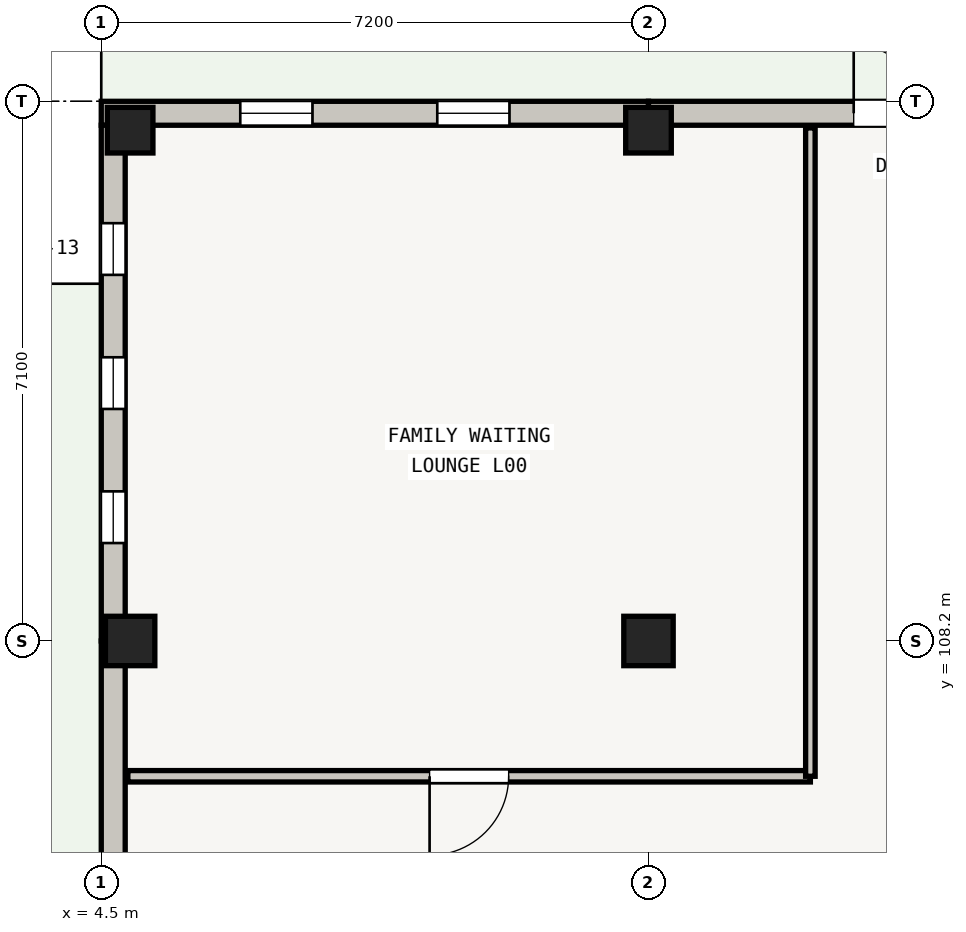
"""IFC4 building model, lengths in metres.
Left out: names, types, materials, properties, quantities, classifications, styles, units other than length and angle.
Written with IfcOpenShell. Run it as: python <this file> out.ifc"""

import sys

from ifc_helpers import new_model, si_unit, direction, frame, frame_2d, origin, origin_2d, place, context, subcontext, project, spatial, rectangle, extrude, element, fill, save


model = new_model("IFC4")
c1 = context("Model", 3, precision=1e-05, world=origin(), true_north=direction((0.0, 1.0)))
c2 = subcontext(c1, "Body", "Model", "MODEL_VIEW")
j1 = project(units=[si_unit("LENGTHUNIT", "METRE"), si_unit("PLANEANGLEUNIT", "RADIAN")], contexts=[c1])
p1 = place(None, origin())
s1 = spatial("IfcSite", under=j1, at=p1, CompositionType="ELEMENT")
p2 = place(p1, origin())
s2 = spatial("IfcBuilding", under=s1, at=p2, CompositionType="ELEMENT")
p3 = place(p2, origin())
s3 = spatial("IfcBuildingStorey", under=s2, at=p3, CompositionType="ELEMENT", Elevation=0.0)
p4 = place(p3, frame((4.88, 108.2, 0.0), z_axis=(0.0, 0.0, 1.0), x_axis=(1.0, 0.0, 0.0)))
e1 = element("IfcColumn", 1, at=p4, inside=s3, PredefinedType="COLUMN", context=c2, shape_type="SweptSolid", body=[
    extrude(rectangle(XDim=0.65, YDim=0.65, at=origin_2d()), origin(), (0.0, 0.0, 1.0), 4.235),
])
p5 = place(p3, frame((4.88, 114.92, 0.0), z_axis=(0.0, 0.0, 1.0), x_axis=(1.0, 0.0, 0.0)))
e2 = element("IfcColumn", 2, at=p5, inside=s3, PredefinedType="COLUMN", context=c2, shape_type="SweptSolid", body=[
    extrude(rectangle(XDim=0.6, YDim=0.6, at=origin_2d()), origin(), (0.0, 0.0, 1.0), 4.235),
])
p6 = place(p3, frame((11.7, 108.2, 0.0), z_axis=(0.0, 0.0, 1.0), x_axis=(1.0, 0.0, 0.0)))
e3 = element("IfcColumn", 3, at=p6, inside=s3, PredefinedType="COLUMN", context=c2, shape_type="SweptSolid", body=[
    extrude(rectangle(XDim=0.65, YDim=0.65, at=origin_2d()), origin(), (0.0, 0.0, 1.0), 4.235),
])
p7 = place(p3, frame((11.7, 114.92, 0.0), z_axis=(0.0, 0.0, 1.0), x_axis=(1.0, 0.0, 0.0)))
e4 = element("IfcColumn", 4, at=p7, inside=s3, PredefinedType="COLUMN", context=c2, shape_type="SweptSolid", body=[
    extrude(rectangle(XDim=0.6, YDim=0.6, at=origin_2d()), origin(), (0.0, 0.0, 1.0), 4.235),
])
p8 = place(p3, frame((4.5, 115.143, 0.0), z_axis=(0.0, 0.0, 1.0), x_axis=(1.0, 0.0, 0.0)))
e5 = element("IfcWall", 5, at=p8, inside=s3, PredefinedType="SOLIDWALL", context=c2, shape_type="SweptSolid", body=[
    extrude(rectangle(XDim=7.2, YDim=0.315, at=frame_2d((3.6, 0.0))), origin(), (0.0, 0.0, 1.0), 3.6),
])
p9 = place(p8, frame((1.829, 0.0, 0.55)))
e6 = element("IfcOpeningElement", 6, at=p9, cuts=e5, PredefinedType="OPENING", context=c2, shape_type="SweptSolid", body=[
    extrude(rectangle(XDim=0.95, YDim=2.02, at=frame_2d((0.475, 1.01))), frame((0.0, 0.157, 0.0), z_axis=(0.0, -1.0, 0.0), x_axis=(1.0, 0.0, 0.0)), (0.0, 0.0, 1.0), 0.315),
])
p10 = place(p8, frame((4.421, 0.0, 0.55)))
e7 = element("IfcOpeningElement", 7, at=p10, cuts=e5, PredefinedType="OPENING", context=c2, shape_type="SweptSolid", body=[
    extrude(rectangle(XDim=0.95, YDim=2.02, at=frame_2d((0.475, 1.01))), frame((0.0, 0.157, 0.0), z_axis=(0.0, -1.0, 0.0), x_axis=(1.0, 0.0, 0.0)), (0.0, 0.0, 1.0), 0.315),
])
p11 = place(p3, frame((11.7, 115.143, 0.0), z_axis=(0.0, 0.0, 1.0), x_axis=(1.0, 0.0, 0.0)))
e8 = element("IfcWall", 8, at=p11, inside=s3, PredefinedType="SOLIDWALL", context=c2, shape_type="SweptSolid", body=[
    extrude(rectangle(XDim=7.2, YDim=0.315, at=frame_2d((3.6, 0.0))), origin(), (0.0, 0.0, 1.0), 3.6),
])
p12 = place(p11, frame((2.7, 0.0, 0.0)))
e9 = element("IfcOpeningElement", 9, at=p12, cuts=e8, PredefinedType="OPENING", context=c2, shape_type="SweptSolid", body=[
    extrude(rectangle(XDim=1.8, YDim=2.1, at=frame_2d((0.9, 1.05))), frame((0.0, 0.157, 0.0), z_axis=(0.0, -1.0, 0.0), x_axis=(1.0, 0.0, 0.0)), (0.0, 0.0, 1.0), 0.315),
])
p13 = place(p3, frame((4.657, 101.48, 0.0), z_axis=(0.0, 0.0, 1.0), x_axis=(0.0, 1.0, 0.0)))
e10 = element("IfcWall", 10, at=p13, inside=s3, PredefinedType="SOLIDWALL", context=c2, shape_type="SweptSolid", body=[
    extrude(rectangle(XDim=6.72, YDim=0.315, at=frame_2d((3.36, 0.0))), origin(), (0.0, 0.0, 1.0), 3.6),
])
p14 = place(p13, frame((3.04, 0.0, 0.55)))
e11 = element("IfcOpeningElement", 11, at=p14, cuts=e10, PredefinedType="OPENING", context=c2, shape_type="SweptSolid", body=[
    extrude(rectangle(XDim=0.64, YDim=2.28, at=frame_2d((0.32, 1.14))), frame((0.0, 0.157, 0.0), z_axis=(0.0, -1.0, 0.0), x_axis=(1.0, 0.0, 0.0)), (0.0, 0.0, 1.0), 0.315),
])
p15 = place(p3, frame((4.657, 108.2, 0.0), z_axis=(0.0, 0.0, 1.0), x_axis=(0.0, 1.0, 0.0)))
e12 = element("IfcWall", 12, at=p15, inside=s3, PredefinedType="SOLIDWALL", context=c2, shape_type="SweptSolid", body=[
    extrude(rectangle(XDim=6.785, YDim=0.315, at=frame_2d((3.393, 0.0))), origin(), (0.0, 0.0, 1.0), 3.62),
])
p16 = place(p15, frame((1.288, 0.0, 0.55)))
e13 = element("IfcOpeningElement", 13, at=p16, cuts=e12, PredefinedType="OPENING", context=c2, shape_type="SweptSolid", body=[
    extrude(rectangle(XDim=0.68, YDim=2.22, at=frame_2d((0.34, 1.11))), frame((0.0, 0.157, 0.0), z_axis=(0.0, -1.0, 0.0), x_axis=(1.0, 0.0, 0.0)), (0.0, 0.0, 1.0), 0.315),
])
p17 = place(p15, frame((3.052, 0.0, 0.55)))
e14 = element("IfcOpeningElement", 14, at=p17, cuts=e12, PredefinedType="OPENING", context=c2, shape_type="SweptSolid", body=[
    extrude(rectangle(XDim=0.68, YDim=2.22, at=frame_2d((0.34, 1.11))), frame((0.0, 0.157, 0.0), z_axis=(0.0, -1.0, 0.0), x_axis=(1.0, 0.0, 0.0)), (0.0, 0.0, 1.0), 0.315),
])
p18 = place(p15, frame((4.817, 0.0, 0.55)))
e15 = element("IfcOpeningElement", 15, at=p18, cuts=e12, PredefinedType="OPENING", context=c2, shape_type="SweptSolid", body=[
    extrude(rectangle(XDim=0.68, YDim=2.22, at=frame_2d((0.34, 1.11))), frame((0.0, 0.157, 0.0), z_axis=(0.0, -1.0, 0.0), x_axis=(1.0, 0.0, 0.0)), (0.0, 0.0, 1.0), 0.315),
])
p19 = place(p3, frame((13.83, 106.42, 0.0), z_axis=(0.0, 0.0, 1.0), x_axis=(-1.0, 0.0, 0.0)))
e16 = element("IfcWall", 16, at=p19, inside=s3, PredefinedType="PARTITIONING", context=c2, shape_type="SweptSolid", body=[
    extrude(rectangle(XDim=8.98, YDim=0.15, at=frame_2d((4.49, 0.0))), origin(), (0.0, 0.0, 1.0), 3.255),
])
p20 = place(p19, frame((3.97, 0.0, 0.0)))
e17 = element("IfcOpeningElement", 17, at=p20, cuts=e16, PredefinedType="OPENING", context=c2, shape_type="SweptSolid", body=[
    extrude(rectangle(XDim=1.04, YDim=2.05, at=frame_2d((0.52, 1.025))), frame((0.0, 0.075, 0.0), z_axis=(0.0, -1.0, 0.0), x_axis=(1.0, 0.0, 0.0)), (0.0, 0.0, 1.0), 0.15),
])
p21 = place(p3, frame((13.83, 114.95, 0.0), z_axis=(0.0, 0.0, 1.0), x_axis=(0.0, -1.0, 0.0)))
e18 = element("IfcWall", 18, at=p21, inside=s3, PredefinedType="PARTITIONING", context=c2, shape_type="SweptSolid", body=[
    extrude(rectangle(XDim=8.53, YDim=0.125, at=frame_2d((4.265, 0.0))), origin(), (0.0, 0.0, 1.0), 3.255),
])
p22 = place(p9, origin())
e19 = element("IfcWindow", 19, at=p22, inside=s3, PartitioningType="DOUBLE_PANEL_VERTICAL", PredefinedType="WINDOW", context=c2, shape_type="SweptSolid", body=[
    extrude(rectangle(XDim=0.95, YDim=2.02, at=frame_2d((0.475, 1.01))), frame((0.0, 0.03, 0.0), z_axis=(0.0, -1.0, 0.0), x_axis=(1.0, 0.0, 0.0)), (0.0, 0.0, 1.0), 0.06),
])
fill(e6, e19)
p23 = place(p10, origin())
e20 = element("IfcWindow", 20, at=p23, inside=s3, PartitioningType="DOUBLE_PANEL_VERTICAL", PredefinedType="WINDOW", context=c2, shape_type="SweptSolid", body=[
    extrude(rectangle(XDim=0.95, YDim=2.02, at=frame_2d((0.475, 1.01))), frame((0.0, 0.03, 0.0), z_axis=(0.0, -1.0, 0.0), x_axis=(1.0, 0.0, 0.0)), (0.0, 0.0, 1.0), 0.06),
])
fill(e7, e20)
p24 = place(p12, origin())
e21 = element("IfcDoor", 21, at=p24, inside=s3, OperationType="DOUBLE_DOOR_SINGLE_SWING", PredefinedType="DOOR", context=c2, shape_type="SweptSolid", body=[
    extrude(rectangle(XDim=1.8, YDim=2.1, at=frame_2d((0.9, 1.05))), frame((0.0, 0.025, 0.0), z_axis=(0.0, -1.0, 0.0), x_axis=(1.0, 0.0, 0.0)), (0.0, 0.0, 1.0), 0.05),
])
fill(e9, e21)
p25 = place(p16, origin())
e22 = element("IfcWindow", 22, at=p25, inside=s3, PartitioningType="SINGLE_PANEL", PredefinedType="WINDOW", context=c2, shape_type="SweptSolid", body=[
    extrude(rectangle(XDim=0.68, YDim=2.22, at=frame_2d((0.34, 1.11))), frame((0.0, 0.03, 0.0), z_axis=(0.0, -1.0, 0.0), x_axis=(1.0, 0.0, 0.0)), (0.0, 0.0, 1.0), 0.06),
])
fill(e13, e22)
p26 = place(p17, origin())
e23 = element("IfcWindow", 23, at=p26, inside=s3, PartitioningType="SINGLE_PANEL", PredefinedType="WINDOW", context=c2, shape_type="SweptSolid", body=[
    extrude(rectangle(XDim=0.68, YDim=2.22, at=frame_2d((0.34, 1.11))), frame((0.0, 0.03, 0.0), z_axis=(0.0, -1.0, 0.0), x_axis=(1.0, 0.0, 0.0)), (0.0, 0.0, 1.0), 0.06),
])
fill(e14, e23)
p27 = place(p18, origin())
e24 = element("IfcWindow", 24, at=p27, inside=s3, PartitioningType="SINGLE_PANEL", PredefinedType="WINDOW", context=c2, shape_type="SweptSolid", body=[
    extrude(rectangle(XDim=0.68, YDim=2.22, at=frame_2d((0.34, 1.11))), frame((0.0, 0.03, 0.0), z_axis=(0.0, -1.0, 0.0), x_axis=(1.0, 0.0, 0.0)), (0.0, 0.0, 1.0), 0.06),
])
fill(e15, e24)
p28 = place(p20, origin())
e25 = element("IfcDoor", 25, at=p28, inside=s3, OperationType="SINGLE_SWING_RIGHT", PredefinedType="DOOR", context=c2, shape_type="SweptSolid", body=[
    extrude(rectangle(XDim=1.04, YDim=2.05, at=frame_2d((0.52, 1.025))), frame((0.0, 0.025, 0.0), z_axis=(0.0, -1.0, 0.0), x_axis=(1.0, 0.0, 0.0)), (0.0, 0.0, 1.0), 0.05),
])
fill(e17, e25)
save(model, sys.argv[1])
